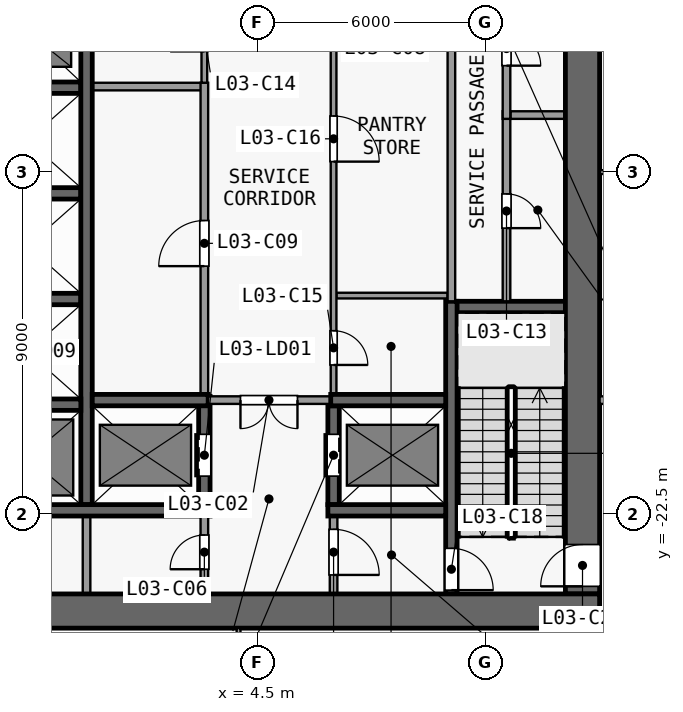
"""IFC4 building model, lengths in metres.
Left out: names, types, materials, properties, quantities, classifications, styles, units other than length and angle.
Written with IfcOpenShell. Run it as: python <this file> out.ifc"""

import sys

from ifc_helpers import new_model, si_unit, direction, frame, frame_2d, origin, place, context, subcontext, project, spatial, rectangle, extrude, element, fill, save


model = new_model("IFC4")
c1 = context("Model", 3, precision=1e-05, world=origin(), true_north=direction((0.0, 1.0)))
c2 = subcontext(c1, "Body", "Model", "MODEL_VIEW")
j1 = project(units=[si_unit("LENGTHUNIT", "METRE"), si_unit("PLANEANGLEUNIT", "RADIAN")], contexts=[c1])
p1 = place(None, origin())
s1 = spatial("IfcSite", under=j1, at=p1, CompositionType="ELEMENT")
p2 = place(p1, origin())
s2 = spatial("IfcBuilding", under=s1, at=p2, CompositionType="ELEMENT")
p3 = place(p2, frame((0.0, 0.0, 18.5)))
s3 = spatial("IfcBuildingStorey", under=s2, at=p3, CompositionType="ELEMENT", Elevation=18.5)
p4 = place(p3, frame((-13.5, -25.05, 0.0), z_axis=(0.0, 0.0, 1.0), x_axis=(1.0, 0.0, 0.0)))
e1 = element("IfcWall", 1, at=p4, inside=s3, PredefinedType="SHEAR", context=c2, shape_type="SweptSolid", body=[
    extrude(rectangle(XDim=27.0, YDim=0.9, at=frame_2d((13.5, 0.0))), origin(), (0.0, 0.0, 1.0), 4.65),
])
p5 = place(p3, frame((13.05, -24.6, 0.0), z_axis=(0.0, 0.0, 1.0), x_axis=(0.0, 1.0, 0.0)))
e2 = element("IfcWall", 2, at=p5, inside=s3, PredefinedType="SHEAR", context=c2, shape_type="SweptSolid", body=[
    extrude(rectangle(XDim=16.1, YDim=0.9, at=frame_2d((8.05, 0.0))), origin(), (0.0, 0.0, 1.0), 4.65),
])
p6 = place(p5, frame((0.2, 0.0, 0.0)))
e3 = element("IfcOpeningElement", 3, at=p6, cuts=e2, PredefinedType="OPENING", context=c2, shape_type="SweptSolid", body=[
    extrude(rectangle(XDim=1.1, YDim=2.1, at=frame_2d((0.55, 1.05))), frame((0.0, 0.46, 0.0), z_axis=(0.0, -1.0, 0.0), x_axis=(1.0, 0.0, 0.0)), (0.0, 0.0, 1.0), 0.92),
])
p7 = place(p3, frame((-2.95, -22.4, 0.0), z_axis=(0.0, 0.0, 1.0), x_axis=(1.0, 0.0, 0.0)))
e4 = element("IfcWall", 4, at=p7, inside=s3, PredefinedType="SHEAR", context=c2, shape_type="SweptSolid", body=[
    extrude(rectangle(XDim=6.2, YDim=0.3, at=frame_2d((3.1, 0.0))), origin(), (0.0, 0.0, 1.0), 4.65),
])
p8 = place(p3, frame((6.35, -22.4, 0.0), z_axis=(0.0, 0.0, 1.0), x_axis=(1.0, 0.0, 0.0)))
e5 = element("IfcWall", 5, at=p8, inside=s3, PredefinedType="SHEAR", context=c2, shape_type="SweptSolid", body=[
    extrude(rectangle(XDim=3.1, YDim=0.3, at=frame_2d((1.55, 0.0))), origin(), (0.0, 0.0, 1.0), 4.65),
])
p9 = place(p3, frame((-2.95, -19.62, 0.0), z_axis=(0.0, 0.0, 1.0), x_axis=(1.0, 0.0, 0.0)))
e6 = element("IfcWall", 6, at=p9, inside=s3, PredefinedType="SHEAR", context=c2, shape_type="SweptSolid", body=[
    extrude(rectangle(XDim=2.8, YDim=0.3, at=frame_2d((1.4, 0.0))), origin(), (0.0, 0.0, 1.0), 4.65),
])
p10 = place(p3, frame((0.15, -19.5, 0.0), z_axis=(0.0, 0.0, 1.0), x_axis=(1.0, 0.0, 0.0)))
e7 = element("IfcWall", 7, at=p10, inside=s3, PredefinedType="SHEAR", context=c2, shape_type="SweptSolid", body=[
    extrude(rectangle(XDim=3.05, YDim=0.3, at=frame_2d((1.525, 0.0))), origin(), (0.0, 0.0, 1.0), 4.65),
])
p11 = place(p3, frame((6.575, -19.5, 0.0), z_axis=(0.0, 0.0, 1.0), x_axis=(-1.0, 0.0, 0.0)))
e8 = element("IfcWall", 8, at=p11, inside=s3, PredefinedType="PARTITIONING", context=c2, shape_type="SweptSolid", body=[
    extrude(rectangle(XDim=3.375, YDim=0.2, at=frame_2d((1.688, 0.0))), origin(), (0.0, 0.0, 1.0), 4.65),
])
p12 = place(p11, frame((1.025, 0.0, 0.0)))
e9 = element("IfcOpeningElement", 9, at=p12, cuts=e8, PredefinedType="OPENING", context=c2, shape_type="SweptSolid", body=[
    extrude(rectangle(XDim=1.5, YDim=2.1, at=frame_2d((0.75, 1.05))), frame((0.0, 0.11, 0.0), z_axis=(0.0, -1.0, 0.0), x_axis=(1.0, 0.0, 0.0)), (0.0, 0.0, 1.0), 0.22),
])
p13 = place(p3, frame((6.425, -19.5, 0.0), z_axis=(0.0, 0.0, 1.0), x_axis=(1.0, 0.0, 0.0)))
e10 = element("IfcWall", 10, at=p13, inside=s3, PredefinedType="SHEAR", context=c2, shape_type="SweptSolid", body=[
    extrude(rectangle(XDim=3.025, YDim=0.3, at=frame_2d((1.512, 0.0))), origin(), (0.0, 0.0, 1.0), 4.65),
])
p14 = place(p3, frame((9.5, -17.05, 0.0), z_axis=(0.0, 0.0, 1.0), x_axis=(1.0, 0.0, 0.0)))
e11 = element("IfcWall", 11, at=p14, inside=s3, PredefinedType="SHEAR", context=c2, shape_type="SweptSolid", body=[
    extrude(rectangle(XDim=3.1, YDim=0.3, at=frame_2d((1.55, 0.0))), origin(), (0.0, 0.0, 1.0), 4.65),
])
p15 = place(p3, frame((-2.95, -16.84, 0.0), z_axis=(0.0, 0.0, 1.0), x_axis=(1.0, 0.0, 0.0)))
e12 = element("IfcWall", 12, at=p15, inside=s3, PredefinedType="SHEAR", context=c2, shape_type="SweptSolid", body=[
    extrude(rectangle(XDim=2.8, YDim=0.3, at=frame_2d((1.4, 0.0))), origin(), (0.0, 0.0, 1.0), 4.65),
])
p16 = place(p3, frame((6.575, -16.75, 0.0), z_axis=(0.0, 0.0, 1.0), x_axis=(1.0, 0.0, 0.0)))
e13 = element("IfcWall", 13, at=p16, inside=s3, PredefinedType="PARTITIONING", context=c2, shape_type="SweptSolid", body=[
    extrude(rectangle(XDim=2.925, YDim=0.15, at=frame_2d((1.462, 0.0))), origin(), (0.0, 0.0, 1.0), 4.65),
])
p17 = place(p3, frame((-2.95, -14.06, 0.0), z_axis=(0.0, 0.0, 1.0), x_axis=(1.0, 0.0, 0.0)))
e14 = element("IfcWall", 14, at=p17, inside=s3, PredefinedType="SHEAR", context=c2, shape_type="SweptSolid", body=[
    extrude(rectangle(XDim=2.8, YDim=0.3, at=frame_2d((1.4, 0.0))), origin(), (0.0, 0.0, 1.0), 4.65),
])
p18 = place(p3, frame((11.15, -12.0, 0.0), z_axis=(0.0, 0.0, 1.0), x_axis=(1.0, 0.0, 0.0)))
e15 = element("IfcWall", 15, at=p18, inside=s3, PredefinedType="PARTITIONING", context=c2, shape_type="SweptSolid", body=[
    extrude(rectangle(XDim=1.45, YDim=0.2, at=frame_2d((0.725, 0.0))), origin(), (0.0, 0.0, 1.0), 4.65),
])
p19 = place(p3, frame((-2.95, -11.28, 0.0), z_axis=(0.0, 0.0, 1.0), x_axis=(1.0, 0.0, 0.0)))
e16 = element("IfcWall", 16, at=p19, inside=s3, PredefinedType="SHEAR", context=c2, shape_type="SweptSolid", body=[
    extrude(rectangle(XDim=2.8, YDim=0.3, at=frame_2d((1.4, 0.0))), origin(), (0.0, 0.0, 1.0), 4.65),
])
p20 = place(p3, frame((0.15, -11.25, 0.0), z_axis=(0.0, 0.0, 1.0), x_axis=(1.0, 0.0, 0.0)))
e17 = element("IfcWall", 17, at=p20, inside=s3, PredefinedType="PARTITIONING", context=c2, shape_type="SweptSolid", body=[
    extrude(rectangle(XDim=3.025, YDim=0.2, at=frame_2d((1.513, 0.0))), origin(), (0.0, 0.0, 1.0), 4.65),
])
p21 = place(p3, frame((0.0, -24.6, 0.0), z_axis=(0.0, 0.0, 1.0), x_axis=(0.0, 1.0, 0.0)))
e18 = element("IfcWall", 18, at=p21, inside=s3, PredefinedType="PARTITIONING", context=c2, shape_type="SweptSolid", body=[
    extrude(rectangle(XDim=2.05, YDim=0.2, at=frame_2d((1.025, 0.0))), origin(), (0.0, 0.0, 1.0), 4.65),
])
p22 = place(p3, frame((0.0, -22.25, 0.0), z_axis=(0.0, 0.0, 1.0), x_axis=(0.0, 1.0, 0.0)))
e19 = element("IfcWall", 19, at=p22, inside=s3, PredefinedType="SHEAR", context=c2, shape_type="SweptSolid", body=[
    extrude(rectangle(XDim=13.75, YDim=0.3, at=frame_2d((6.875, 0.0))), origin(), (0.0, 0.0, 1.0), 4.65),
])
p23 = place(p3, frame((3.1, -24.6, 0.0), z_axis=(0.0, 0.0, 1.0), x_axis=(0.0, 1.0, 0.0)))
e20 = element("IfcWall", 20, at=p23, inside=s3, PredefinedType="PARTITIONING", context=c2, shape_type="SweptSolid", body=[
    extrude(rectangle(XDim=2.05, YDim=0.2, at=frame_2d((1.025, 0.0))), origin(), (0.0, 0.0, 1.0), 4.65),
])
p24 = place(p23, frame((0.65, 0.0, 0.0)))
e21 = element("IfcOpeningElement", 21, at=p24, cuts=e20, PredefinedType="OPENING", context=c2, shape_type="SweptSolid", body=[
    extrude(rectangle(XDim=0.9, YDim=2.1, at=frame_2d((0.45, 1.05))), frame((0.0, 0.11, 0.0), z_axis=(0.0, -1.0, 0.0), x_axis=(1.0, 0.0, 0.0)), (0.0, 0.0, 1.0), 0.22),
])
p25 = place(p3, frame((3.1, -22.25, 0.0), z_axis=(0.0, 0.0, 1.0), x_axis=(0.0, 1.0, 0.0)))
e22 = element("IfcWall", 22, at=p25, inside=s3, PredefinedType="SHEAR", context=c2, shape_type="SweptSolid", body=[
    extrude(rectangle(XDim=2.85, YDim=0.3, at=frame_2d((1.425, 0.0))), origin(), (0.0, 0.0, 1.0), 4.65),
])
p26 = place(p25, frame((0.75, 0.0, 0.0)))
e23 = element("IfcOpeningElement", 23, at=p26, cuts=e22, PredefinedType="OPENING", context=c2, shape_type="SweptSolid", body=[
    extrude(rectangle(XDim=1.1, YDim=2.1, at=frame_2d((0.55, 1.05))), frame((0.0, 0.16, 0.0), z_axis=(0.0, -1.0, 0.0), x_axis=(1.0, 0.0, 0.0)), (0.0, 0.0, 1.0), 0.32),
])
p27 = place(p3, frame((3.1, -19.6, 0.0), z_axis=(0.0, 0.0, 1.0), x_axis=(0.0, 1.0, 0.0)))
e24 = element("IfcWall", 24, at=p27, inside=s3, PredefinedType="PARTITIONING", context=c2, shape_type="SweptSolid", body=[
    extrude(rectangle(XDim=8.45, YDim=0.2, at=frame_2d((4.225, 0.0))), origin(), (0.0, 0.0, 1.0), 4.65),
])
p28 = place(p27, frame((3.625, 0.0, 0.0)))
e25 = element("IfcOpeningElement", 25, at=p28, cuts=e24, PredefinedType="OPENING", context=c2, shape_type="SweptSolid", body=[
    extrude(rectangle(XDim=1.2, YDim=2.1, at=frame_2d((0.6, 1.05))), frame((0.0, 0.11, 0.0), z_axis=(0.0, -1.0, 0.0), x_axis=(1.0, 0.0, 0.0)), (0.0, 0.0, 1.0), 0.22),
])
p29 = place(p3, frame((3.1, -11.15, 0.0), z_axis=(0.0, 0.0, 1.0), x_axis=(0.0, 1.0, 0.0)))
e26 = element("IfcWall", 26, at=p29, inside=s3, PredefinedType="PARTITIONING", context=c2, shape_type="SweptSolid", body=[
    extrude(rectangle(XDim=2.65, YDim=0.15, at=frame_2d((1.325, 0.0))), origin(), (0.0, 0.0, 1.0), 4.65),
])
p30 = place(p29, frame((0.825, 0.0, 0.0)))
e27 = element("IfcOpeningElement", 27, at=p30, cuts=e26, PredefinedType="OPENING", context=c2, shape_type="SweptSolid", body=[
    extrude(rectangle(XDim=0.9, YDim=2.1, at=frame_2d((0.45, 1.05))), frame((0.0, 0.085, 0.0), z_axis=(0.0, -1.0, 0.0), x_axis=(1.0, 0.0, 0.0)), (0.0, 0.0, 1.0), 0.17),
])
p31 = place(p3, frame((6.5, -22.55, 0.0), z_axis=(0.0, 0.0, 1.0), x_axis=(0.0, -1.0, 0.0)))
e28 = element("IfcWall", 28, at=p31, inside=s3, PredefinedType="PARTITIONING", context=c2, shape_type="SweptSolid", body=[
    extrude(rectangle(XDim=2.05, YDim=0.2, at=frame_2d((1.025, 0.0))), origin(), (0.0, 0.0, 1.0), 4.65),
])
p32 = place(p31, frame((0.35, 0.0, 0.0)))
e29 = element("IfcOpeningElement", 29, at=p32, cuts=e28, PredefinedType="OPENING", context=c2, shape_type="SweptSolid", body=[
    extrude(rectangle(XDim=1.2, YDim=2.1, at=frame_2d((0.6, 1.05))), frame((0.0, 0.11, 0.0), z_axis=(0.0, -1.0, 0.0), x_axis=(1.0, 0.0, 0.0)), (0.0, 0.0, 1.0), 0.22),
])
p33 = place(p3, frame((6.5, -22.25, 0.0), z_axis=(0.0, 0.0, 1.0), x_axis=(0.0, 1.0, 0.0)))
e30 = element("IfcWall", 30, at=p33, inside=s3, PredefinedType="SHEAR", context=c2, shape_type="SweptSolid", body=[
    extrude(rectangle(XDim=2.6, YDim=0.3, at=frame_2d((1.3, 0.0))), origin(), (0.0, 0.0, 1.0), 4.65),
])
p34 = place(p33, frame((0.75, 0.0, 0.0)))
e31 = element("IfcOpeningElement", 31, at=p34, cuts=e30, PredefinedType="OPENING", context=c2, shape_type="SweptSolid", body=[
    extrude(rectangle(XDim=1.1, YDim=2.1, at=frame_2d((0.55, 1.05))), frame((0.0, 0.16, 0.0), z_axis=(0.0, -1.0, 0.0), x_axis=(1.0, 0.0, 0.0)), (0.0, 0.0, 1.0), 0.32),
])
p35 = place(p3, frame((6.5, -8.5, 0.0), z_axis=(0.0, 0.0, 1.0), x_axis=(0.0, -1.0, 0.0)))
e32 = element("IfcWall", 32, at=p35, inside=s3, PredefinedType="PARTITIONING", context=c2, shape_type="SweptSolid", body=[
    extrude(rectangle(XDim=10.85, YDim=0.15, at=frame_2d((5.425, 0.0))), origin(), (0.0, 0.0, 1.0), 4.65),
])
p36 = place(p35, frame((9.175, 0.0, 0.0)))
e33 = element("IfcOpeningElement", 33, at=p36, cuts=e32, PredefinedType="OPENING", context=c2, shape_type="SweptSolid", body=[
    extrude(rectangle(XDim=0.9, YDim=2.1, at=frame_2d((0.45, 1.05))), frame((0.0, 0.085, 0.0), z_axis=(0.0, -1.0, 0.0), x_axis=(1.0, 0.0, 0.0)), (0.0, 0.0, 1.0), 0.17),
])
p37 = place(p35, frame((3.525, 0.0, 0.0)))
e34 = element("IfcOpeningElement", 34, at=p37, cuts=e32, PredefinedType="OPENING", context=c2, shape_type="SweptSolid", body=[
    extrude(rectangle(XDim=1.2, YDim=2.1, at=frame_2d((0.6, 1.05))), frame((0.0, 0.085, 0.0), z_axis=(0.0, -1.0, 0.0), x_axis=(1.0, 0.0, 0.0)), (0.0, 0.0, 1.0), 0.17),
])
p38 = place(p3, frame((9.6, -16.9, 0.0), z_axis=(0.0, 0.0, 1.0), x_axis=(0.0, -1.0, 0.0)))
e35 = element("IfcWall", 35, at=p38, inside=s3, PredefinedType="SHEAR", context=c2, shape_type="SweptSolid", body=[
    extrude(rectangle(XDim=7.7, YDim=0.3, at=frame_2d((3.85, 0.0))), origin(), (0.0, 0.0, 1.0), 4.65),
])
p39 = place(p38, frame((6.5, 0.0, 0.0)))
e36 = element("IfcOpeningElement", 36, at=p39, cuts=e35, PredefinedType="OPENING", context=c2, shape_type="SweptSolid", body=[
    extrude(rectangle(XDim=1.1, YDim=2.1, at=frame_2d((0.55, 1.05))), frame((0.0, 0.16, 0.0), z_axis=(0.0, -1.0, 0.0), x_axis=(1.0, 0.0, 0.0)), (0.0, 0.0, 1.0), 0.32),
])
p40 = place(p3, frame((9.6, -16.9, 0.0), z_axis=(0.0, 0.0, 1.0), x_axis=(0.0, 1.0, 0.0)))
e37 = element("IfcWall", 37, at=p40, inside=s3, PredefinedType="PARTITIONING", context=c2, shape_type="SweptSolid", body=[
    extrude(rectangle(XDim=8.4, YDim=0.2, at=frame_2d((4.2, 0.0))), origin(), (0.0, 0.0, 1.0), 4.65),
])
p41 = place(p3, frame((11.05, -11.9, 0.0), z_axis=(0.0, 0.0, 1.0), x_axis=(0.0, -1.0, 0.0)))
e38 = element("IfcWall", 38, at=p41, inside=s3, PredefinedType="PARTITIONING", context=c2, shape_type="SweptSolid", body=[
    extrude(rectangle(XDim=5.0, YDim=0.2, at=frame_2d((2.5, 0.0))), origin(), (0.0, 0.0, 1.0), 4.65),
])
p42 = place(p41, frame((2.175, 0.0, 0.0)))
e39 = element("IfcOpeningElement", 39, at=p42, cuts=e38, PredefinedType="OPENING", context=c2, shape_type="SweptSolid", body=[
    extrude(rectangle(XDim=0.9, YDim=2.1, at=frame_2d((0.45, 1.05))), frame((0.0, 0.11, 0.0), z_axis=(0.0, -1.0, 0.0), x_axis=(1.0, 0.0, 0.0)), (0.0, 0.0, 1.0), 0.22),
])
p43 = place(p3, frame((11.05, -8.5, 0.0), z_axis=(0.0, 0.0, 1.0), x_axis=(0.0, -1.0, 0.0)))
e40 = element("IfcWall", 40, at=p43, inside=s3, PredefinedType="PARTITIONING", context=c2, shape_type="SweptSolid", body=[
    extrude(rectangle(XDim=3.6, YDim=0.2, at=frame_2d((1.8, 0.0))), origin(), (0.0, 0.0, 1.0), 4.65),
])
p44 = place(p43, frame((1.3, 0.0, 0.0)))
e41 = element("IfcOpeningElement", 41, at=p44, cuts=e40, PredefinedType="OPENING", context=c2, shape_type="SweptSolid", body=[
    extrude(rectangle(XDim=0.9, YDim=2.1, at=frame_2d((0.45, 1.05))), frame((0.0, 0.11, 0.0), z_axis=(0.0, -1.0, 0.0), x_axis=(1.0, 0.0, 0.0)), (0.0, 0.0, 1.0), 0.22),
])
p45 = place(p3, frame((13.5, -25.5, 0.0), z_axis=(0.0, 0.0, 1.0), x_axis=(1.0, 0.0, 0.0)))
e42 = element("IfcWall", 42, at=p45, inside=s3, PredefinedType="PARTITIONING", context=c2, shape_type="SweptSolid", body=[
    extrude(rectangle(XDim=4.1, YDim=0.2, at=frame_2d((2.05, 0.0))), origin(), (0.0, 0.0, 1.0), 4.65),
])
p46 = place(p3, frame((13.5, -19.5, 0.0), z_axis=(0.0, 0.0, 1.0), x_axis=(1.0, 0.0, 0.0)))
e43 = element("IfcWall", 43, at=p46, inside=s3, PredefinedType="PARTITIONING", context=c2, shape_type="SweptSolid", body=[
    extrude(rectangle(XDim=15.1, YDim=0.2, at=frame_2d((7.55, 0.0))), origin(), (0.0, 0.0, 1.0), 4.65),
])
p47 = place(p46, frame((7.0, 0.0, 0.0)))
e44 = element("IfcOpeningElement", 44, at=p47, cuts=e43, PredefinedType="OPENING", context=c2, shape_type="SweptSolid", body=[
    extrude(rectangle(XDim=1.0, YDim=2.1, at=frame_2d((0.5, 1.05))), frame((0.0, 0.11, 0.0), z_axis=(0.0, -1.0, 0.0), x_axis=(1.0, 0.0, 0.0)), (0.0, 0.0, 1.0), 0.22),
])
p48 = place(p3, frame((13.5, -13.5, 0.0), z_axis=(0.0, 0.0, 1.0), x_axis=(1.0, 0.0, 0.0)))
e45 = element("IfcWall", 45, at=p48, inside=s3, PredefinedType="PARTITIONING", context=c2, shape_type="SweptSolid", body=[
    extrude(rectangle(XDim=14.9, YDim=0.1, at=frame_2d((7.45, 0.0))), origin(), (0.0, 0.0, 1.0), 4.65),
])
p49 = place(p3, frame((4.0, -31.4, 0.0), z_axis=(0.0, 0.0, 1.0), x_axis=(0.0, 1.0, 0.0)))
e46 = element("IfcWall", 46, at=p49, inside=s3, PredefinedType="PARTITIONING", context=c2, shape_type="SweptSolid", body=[
    extrude(rectangle(XDim=5.9, YDim=0.1, at=frame_2d((2.95, 0.0))), origin(), (0.0, 0.0, 1.0), 4.65),
])
p50 = place(p26, origin())
e47 = element("IfcDoor", 47, at=p50, inside=s3, OperationType="DOUBLE_DOOR_SLIDING", PredefinedType="DOOR", context=c2, shape_type="SweptSolid", body=[
    extrude(rectangle(XDim=1.1, YDim=2.1, at=frame_2d((0.55, 1.05))), frame((0.0, 0.025, 0.0), z_axis=(0.0, -1.0, 0.0), x_axis=(1.0, 0.0, 0.0)), (0.0, 0.0, 1.0), 0.05),
])
fill(e23, e47)
p51 = place(p34, origin())
e48 = element("IfcDoor", 48, at=p51, inside=s3, OperationType="DOUBLE_DOOR_SLIDING", PredefinedType="DOOR", context=c2, shape_type="SweptSolid", body=[
    extrude(rectangle(XDim=1.1, YDim=2.1, at=frame_2d((0.55, 1.05))), frame((0.0, 0.025, 0.0), z_axis=(0.0, -1.0, 0.0), x_axis=(1.0, 0.0, 0.0)), (0.0, 0.0, 1.0), 0.05),
])
fill(e31, e48)
p52 = place(p32, origin())
e49 = element("IfcDoor", 49, at=p52, inside=s3, OperationType="SINGLE_SWING_RIGHT", PredefinedType="DOOR", context=c2, shape_type="SweptSolid", body=[
    extrude(rectangle(XDim=1.2, YDim=2.1, at=frame_2d((0.6, 1.05))), frame((0.0, 0.025, 0.0), z_axis=(0.0, -1.0, 0.0), x_axis=(1.0, 0.0, 0.0)), (0.0, 0.0, 1.0), 0.05),
])
fill(e29, e49)
p53 = place(p12, origin())
e50 = element("IfcDoor", 50, at=p53, inside=s3, OperationType="DOUBLE_DOOR_SINGLE_SWING", PredefinedType="DOOR", context=c2, shape_type="SweptSolid", body=[
    extrude(rectangle(XDim=1.5, YDim=2.1, at=frame_2d((0.75, 1.05))), frame((0.0, 0.025, 0.0), z_axis=(0.0, -1.0, 0.0), x_axis=(1.0, 0.0, 0.0)), (0.0, 0.0, 1.0), 0.05),
])
fill(e9, e50)
p54 = place(p24, origin())
e51 = element("IfcDoor", 51, at=p54, inside=s3, OperationType="SINGLE_SWING_LEFT", PredefinedType="DOOR", context=c2, shape_type="SweptSolid", body=[
    extrude(rectangle(XDim=0.9, YDim=2.1, at=frame_2d((0.45, 1.05))), frame((0.0, 0.025, 0.0), z_axis=(0.0, -1.0, 0.0), x_axis=(1.0, 0.0, 0.0)), (0.0, 0.0, 1.0), 0.05),
])
fill(e21, e51)
p55 = place(p44, origin())
e52 = element("IfcDoor", 52, at=p55, inside=s3, OperationType="SINGLE_SWING_RIGHT", PredefinedType="DOOR", context=c2, shape_type="SweptSolid", body=[
    extrude(rectangle(XDim=0.9, YDim=2.1, at=frame_2d((0.45, 1.05))), frame((0.0, 0.025, 0.0), z_axis=(0.0, -1.0, 0.0), x_axis=(1.0, 0.0, 0.0)), (0.0, 0.0, 1.0), 0.05),
])
fill(e41, e52)
p56 = place(p28, origin())
e53 = element("IfcDoor", 53, at=p56, inside=s3, OperationType="SINGLE_SWING_LEFT", PredefinedType="DOOR", context=c2, shape_type="SweptSolid", body=[
    extrude(rectangle(XDim=1.2, YDim=2.1, at=frame_2d((0.6, 1.05))), frame((0.0, 0.025, 0.0), z_axis=(0.0, -1.0, 0.0), x_axis=(1.0, 0.0, 0.0)), (0.0, 0.0, 1.0), 0.05),
])
fill(e25, e53)
p57 = place(p42, origin())
e54 = element("IfcDoor", 54, at=p57, inside=s3, OperationType="SINGLE_SWING_RIGHT", PredefinedType="DOOR", context=c2, shape_type="SweptSolid", body=[
    extrude(rectangle(XDim=0.9, YDim=2.1, at=frame_2d((0.45, 1.05))), frame((0.0, 0.025, 0.0), z_axis=(0.0, -1.0, 0.0), x_axis=(1.0, 0.0, 0.0)), (0.0, 0.0, 1.0), 0.05),
])
fill(e39, e54)
p58 = place(p36, origin())
e55 = element("IfcDoor", 55, at=p58, inside=s3, OperationType="SINGLE_SWING_RIGHT", PredefinedType="DOOR", context=c2, shape_type="SweptSolid", body=[
    extrude(rectangle(XDim=0.9, YDim=2.1, at=frame_2d((0.45, 1.05))), frame((0.0, 0.025, 0.0), z_axis=(0.0, -1.0, 0.0), x_axis=(1.0, 0.0, 0.0)), (0.0, 0.0, 1.0), 0.05),
])
fill(e33, e55)
p59 = place(p37, origin())
e56 = element("IfcDoor", 56, at=p59, inside=s3, OperationType="SINGLE_SWING_RIGHT", PredefinedType="DOOR", context=c2, shape_type="SweptSolid", body=[
    extrude(rectangle(XDim=1.2, YDim=2.1, at=frame_2d((0.6, 1.05))), frame((0.0, 0.025, 0.0), z_axis=(0.0, -1.0, 0.0), x_axis=(1.0, 0.0, 0.0)), (0.0, 0.0, 1.0), 0.05),
])
fill(e34, e56)
p60 = place(p39, origin())
e57 = element("IfcDoor", 57, at=p60, inside=s3, OperationType="SINGLE_SWING_RIGHT", PredefinedType="DOOR", context=c2, shape_type="SweptSolid", body=[
    extrude(rectangle(XDim=1.1, YDim=2.1, at=frame_2d((0.55, 1.05))), frame((0.0, 0.025, 0.0), z_axis=(0.0, -1.0, 0.0), x_axis=(1.0, 0.0, 0.0)), (0.0, 0.0, 1.0), 0.05),
])
fill(e36, e57)
p61 = place(p6, origin())
e58 = element("IfcDoor", 58, at=p61, inside=s3, OperationType="SINGLE_SWING_LEFT", PredefinedType="DOOR", context=c2, shape_type="SweptSolid", body=[
    extrude(rectangle(XDim=1.1, YDim=2.1, at=frame_2d((0.55, 1.05))), frame((0.0, 0.025, 0.0), z_axis=(0.0, -1.0, 0.0), x_axis=(1.0, 0.0, 0.0)), (0.0, 0.0, 1.0), 0.05),
])
fill(e3, e58)
save(model, sys.argv[1])
